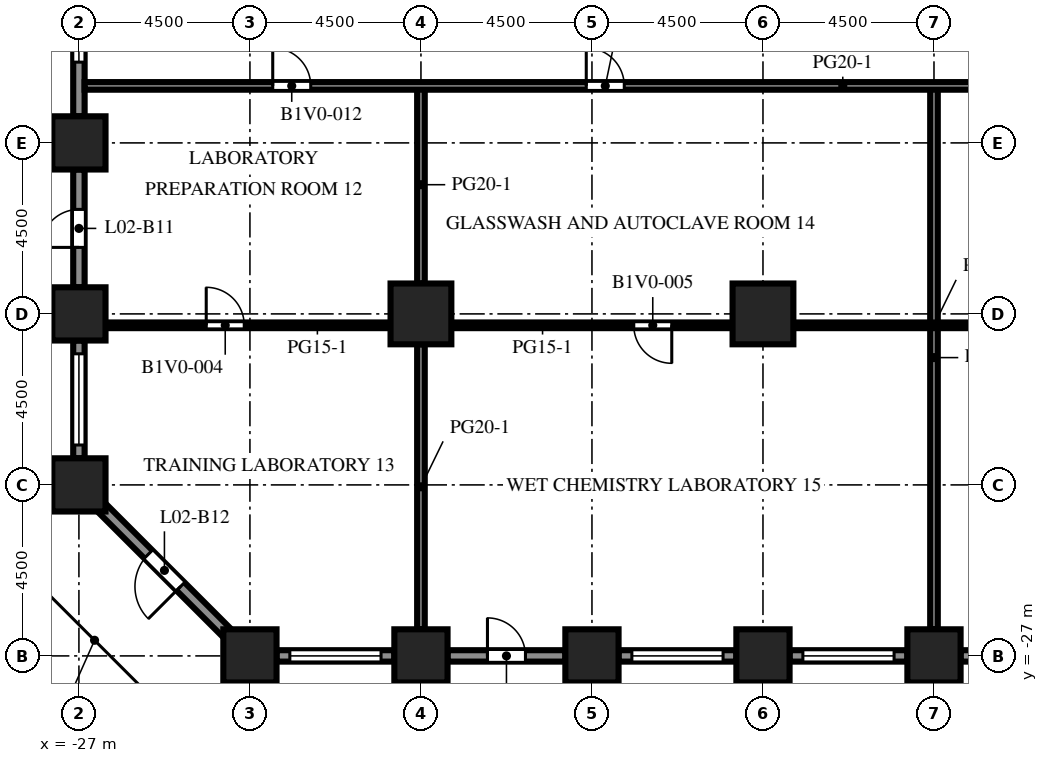
"""IFC4 building model, lengths in metres.
Left out: names, types, materials, properties, quantities, classifications, styles, units other than length and angle.
Written with IfcOpenShell. Run it as: python <this file> out.ifc"""

import sys

from ifc_helpers import new_model, si_unit, direction, frame, frame_2d, origin, origin_2d, place, context, subcontext, project, spatial, rectangle, extrude, element, fill, save


model = new_model("IFC4")
c1 = context("Model", 3, precision=1e-05, world=origin(), true_north=direction((0.0, 1.0)))
c2 = subcontext(c1, "Body", "Model", "MODEL_VIEW")
j1 = project(units=[si_unit("LENGTHUNIT", "METRE"), si_unit("PLANEANGLEUNIT", "RADIAN")], contexts=[c1])
p1 = place(None, origin())
s1 = spatial("IfcSite", under=j1, at=p1, CompositionType="ELEMENT")
p2 = place(p1, origin())
s2 = spatial("IfcBuilding", under=s1, at=p2, CompositionType="ELEMENT")
p3 = place(p2, frame((0.0, 0.0, 11.3)))
s3 = spatial("IfcBuildingStorey", under=s2, at=p3, CompositionType="ELEMENT", Elevation=11.3)
for number, where, z_axis, x_axis in (
    (1, (-27.0, -22.5, 0.0), (0.0, 0.0, 1.0), (1.0, 0.0, 0.0)),
    (2, (-27.0, -18.0, 0.0), (0.0, 0.0, 1.0), (1.0, 0.0, 0.0)),
    (3, (-27.0, -13.5, 0.0), (0.0, 0.0, 1.0), (1.0, 0.0, 0.0)),
    (4, (-22.5, -27.0, 0.0), (0.0, 0.0, 1.0), (1.0, 0.0, 0.0)),
    (5, (-18.0, -27.0, 0.0), (0.0, 0.0, 1.0), (1.0, 0.0, 0.0)),
    (6, (-13.5, -27.0, 0.0), (0.0, 0.0, 1.0), (1.0, 0.0, 0.0)),
    (7, (-9.0, -27.0, 0.0), (0.0, 0.0, 1.0), (1.0, 0.0, 0.0)),
    (8, (-4.5, -27.0, 0.0), (0.0, 0.0, 1.0), (1.0, 0.0, 0.0)),
):
    element("IfcColumn", number, at=place(p3, frame(where, z_axis=z_axis, x_axis=x_axis)), inside=s3, PredefinedType="COLUMN", context=c2, shape_type="SweptSolid", body=[
        extrude(rectangle(XDim=1.4, YDim=1.4, at=origin_2d()), origin(), (0.0, 0.0, 1.0), 4.1),
    ])
for number, where, z_axis, x_axis in (
    (9, (-18.0, -18.0, 0.0), (0.0, 0.0, 1.0), (1.0, 0.0, 0.0)),
    (10, (-9.0, -18.0, 0.0), (0.0, 0.0, 1.0), (1.0, 0.0, 0.0)),
):
    element("IfcColumn", number, at=place(p3, frame(where, z_axis=z_axis, x_axis=x_axis)), inside=s3, PredefinedType="COLUMN", context=c2, shape_type="SweptSolid", body=[
        extrude(rectangle(XDim=1.6, YDim=1.6, at=origin_2d()), origin(), (0.0, 0.0, 1.0), 4.1),
    ])
p4 = place(p3, frame((-18.7, -27.0, 0.0), z_axis=(0.0, 0.0, 1.0), x_axis=(-1.0, 0.0, 0.0)))
e11 = element("IfcWall", 11, at=p4, inside=s3, PredefinedType="SOLIDWALL", context=c2, shape_type="SweptSolid", body=[
    extrude(rectangle(XDim=3.1, YDim=0.3, at=frame_2d((1.55, 0.0))), origin(), (0.0, 0.0, 1.0), 2.75),
])
p5 = place(p4, frame((0.35, 0.0, 0.8)))
e12 = element("IfcOpeningElement", 12, at=p5, cuts=e11, PredefinedType="OPENING", context=c2, shape_type="SweptSolid", body=[
    extrude(rectangle(XDim=2.4, YDim=1.7, at=frame_2d((1.2, 0.85))), frame((0.0, 0.16, 0.0), z_axis=(0.0, -1.0, 0.0), x_axis=(1.0, 0.0, 0.0)), (0.0, 0.0, 1.0), 0.32),
])
p6 = place(p3, frame((-14.2, -27.0, 0.0), z_axis=(0.0, 0.0, 1.0), x_axis=(-1.0, 0.0, 0.0)))
e13 = element("IfcWall", 13, at=p6, inside=s3, PredefinedType="SOLIDWALL", context=c2, shape_type="SweptSolid", body=[
    extrude(rectangle(XDim=3.1, YDim=0.3, at=frame_2d((1.55, 0.0))), origin(), (0.0, 0.0, 1.0), 2.75),
])
p7 = place(p6, frame((1.05, 0.0, 0.0)))
e14 = element("IfcOpeningElement", 14, at=p7, cuts=e13, PredefinedType="OPENING", context=c2, shape_type="SweptSolid", body=[
    extrude(rectangle(XDim=1.0, YDim=2.2, at=frame_2d((0.5, 1.1))), frame((0.0, 0.16, 0.0), z_axis=(0.0, -1.0, 0.0), x_axis=(1.0, 0.0, 0.0)), (0.0, 0.0, 1.0), 0.32),
])
p8 = place(p3, frame((-9.7, -27.0, 0.0), z_axis=(0.0, 0.0, 1.0), x_axis=(-1.0, 0.0, 0.0)))
e15 = element("IfcWall", 15, at=p8, inside=s3, PredefinedType="SOLIDWALL", context=c2, shape_type="SweptSolid", body=[
    extrude(rectangle(XDim=3.1, YDim=0.3, at=frame_2d((1.55, 0.0))), origin(), (0.0, 0.0, 1.0), 2.75),
])
p9 = place(p8, frame((0.35, 0.0, 0.8)))
e16 = element("IfcOpeningElement", 16, at=p9, cuts=e15, PredefinedType="OPENING", context=c2, shape_type="SweptSolid", body=[
    extrude(rectangle(XDim=2.4, YDim=1.7, at=frame_2d((1.2, 0.85))), frame((0.0, 0.16, 0.0), z_axis=(0.0, -1.0, 0.0), x_axis=(1.0, 0.0, 0.0)), (0.0, 0.0, 1.0), 0.32),
])
p10 = place(p3, frame((-5.2, -27.0, 0.0), z_axis=(0.0, 0.0, 1.0), x_axis=(-1.0, 0.0, 0.0)))
e17 = element("IfcWall", 17, at=p10, inside=s3, PredefinedType="SOLIDWALL", context=c2, shape_type="SweptSolid", body=[
    extrude(rectangle(XDim=3.1, YDim=0.3, at=frame_2d((1.55, 0.0))), origin(), (0.0, 0.0, 1.0), 2.75),
])
p11 = place(p10, frame((0.35, 0.0, 0.8)))
e18 = element("IfcOpeningElement", 18, at=p11, cuts=e17, PredefinedType="OPENING", context=c2, shape_type="SweptSolid", body=[
    extrude(rectangle(XDim=2.4, YDim=1.7, at=frame_2d((1.2, 0.85))), frame((0.0, 0.16, 0.0), z_axis=(0.0, -1.0, 0.0), x_axis=(1.0, 0.0, 0.0)), (0.0, 0.0, 1.0), 0.32),
])
p12 = place(p3, frame((-0.7, -27.0, 0.0), z_axis=(0.0, 0.0, 1.0), x_axis=(-1.0, 0.0, 0.0)))
e19 = element("IfcWall", 19, at=p12, inside=s3, PredefinedType="SOLIDWALL", context=c2, shape_type="SweptSolid", body=[
    extrude(rectangle(XDim=3.1, YDim=0.3, at=frame_2d((1.55, 0.0))), origin(), (0.0, 0.0, 1.0), 2.75),
])
p13 = place(p12, frame((0.35, 0.0, 0.8)))
e20 = element("IfcOpeningElement", 20, at=p13, cuts=e19, PredefinedType="OPENING", context=c2, shape_type="SweptSolid", body=[
    extrude(rectangle(XDim=2.4, YDim=1.7, at=frame_2d((1.2, 0.85))), frame((0.0, 0.16, 0.0), z_axis=(0.0, -1.0, 0.0), x_axis=(1.0, 0.0, 0.0)), (0.0, 0.0, 1.0), 0.32),
])
p14 = place(p3, frame((-27.0, -12.8, 0.0), z_axis=(0.0, 0.0, 1.0), x_axis=(0.0, 1.0, 0.0)))
e21 = element("IfcWall", 21, at=p14, inside=s3, PredefinedType="SOLIDWALL", context=c2, shape_type="SweptSolid", body=[
    extrude(rectangle(XDim=3.1, YDim=0.3, at=frame_2d((1.55, 0.0))), origin(), (0.0, 0.0, 1.0), 2.75),
])
p15 = place(p14, frame((1.425, 0.0, 0.8)))
e22 = element("IfcOpeningElement", 22, at=p15, cuts=e21, PredefinedType="OPENING", context=c2, shape_type="SweptSolid", body=[
    extrude(rectangle(XDim=1.2, YDim=1.7, at=frame_2d((0.6, 0.85))), frame((0.0, 0.16, 0.0), z_axis=(0.0, -1.0, 0.0), x_axis=(1.0, 0.0, 0.0)), (0.0, 0.0, 1.0), 0.32),
])
p16 = place(p3, frame((-27.0, -17.3, 0.0), z_axis=(0.0, 0.0, 1.0), x_axis=(0.0, 1.0, 0.0)))
e23 = element("IfcWall", 23, at=p16, inside=s3, PredefinedType="SOLIDWALL", context=c2, shape_type="SweptSolid", body=[
    extrude(rectangle(XDim=3.1, YDim=0.3, at=frame_2d((1.55, 0.0))), origin(), (0.0, 0.0, 1.0), 2.75),
])
p17 = place(p16, frame((1.05, 0.0, 0.0)))
e24 = element("IfcOpeningElement", 24, at=p17, cuts=e23, PredefinedType="OPENING", context=c2, shape_type="SweptSolid", body=[
    extrude(rectangle(XDim=1.0, YDim=2.2, at=frame_2d((0.5, 1.1))), frame((0.0, 0.16, 0.0), z_axis=(0.0, -1.0, 0.0), x_axis=(1.0, 0.0, 0.0)), (0.0, 0.0, 1.0), 0.32),
])
p18 = place(p3, frame((-27.0, -21.8, 0.0), z_axis=(0.0, 0.0, 1.0), x_axis=(0.0, 1.0, 0.0)))
e25 = element("IfcWall", 25, at=p18, inside=s3, PredefinedType="SOLIDWALL", context=c2, shape_type="SweptSolid", body=[
    extrude(rectangle(XDim=3.1, YDim=0.3, at=frame_2d((1.55, 0.0))), origin(), (0.0, 0.0, 1.0), 2.75),
])
p19 = place(p18, frame((0.35, 0.0, 0.8)))
e26 = element("IfcOpeningElement", 26, at=p19, cuts=e25, PredefinedType="OPENING", context=c2, shape_type="SweptSolid", body=[
    extrude(rectangle(XDim=2.4, YDim=1.7, at=frame_2d((1.2, 0.85))), frame((0.0, 0.16, 0.0), z_axis=(0.0, -1.0, 0.0), x_axis=(1.0, 0.0, 0.0)), (0.0, 0.0, 1.0), 0.32),
])
p20 = place(p3, frame((-23.094, -26.406, 0.0), z_axis=(0.0, 0.0, 1.0), x_axis=(-0.707106781187, 0.707106781187, 0.0)))
e27 = element("IfcWall", 27, at=p20, inside=s3, PredefinedType="SOLIDWALL", context=c2, shape_type="SweptSolid", body=[
    extrude(rectangle(XDim=4.684, YDim=0.3, at=frame_2d((2.342, 0.0))), origin(), (0.0, 0.0, 1.0), 2.75),
])
p21 = place(p20, frame((1.742, 0.0, 0.0)))
e28 = element("IfcOpeningElement", 28, at=p21, cuts=e27, PredefinedType="OPENING", context=c2, shape_type="SweptSolid", body=[
    extrude(rectangle(XDim=1.2, YDim=2.2, at=frame_2d((0.6, 1.1))), frame((0.0, 0.16, 0.0), z_axis=(0.0, -1.0, 0.0), x_axis=(1.0, 0.0, 0.0)), (0.0, 0.0, 1.0), 0.32),
])
p22 = place(p3, frame((-18.0, -26.3, 0.0), z_axis=(0.0, 0.0, 1.0), x_axis=(0.0, 1.0, 0.0)))
e29 = element("IfcWall", 29, at=p22, inside=s3, PredefinedType="PARTITIONING", context=c2, shape_type="SweptSolid", body=[
    extrude(rectangle(XDim=7.5, YDim=0.2, at=frame_2d((3.75, 0.0))), origin(), (0.0, 0.0, 1.0), 3.65),
])
p23 = place(p3, frame((-18.0, -17.2, 0.0), z_axis=(0.0, 0.0, 1.0), x_axis=(0.0, 1.0, 0.0)))
e30 = element("IfcWall", 30, at=p23, inside=s3, PredefinedType="PARTITIONING", context=c2, shape_type="SweptSolid", body=[
    extrude(rectangle(XDim=5.2, YDim=0.2, at=frame_2d((2.6, 0.0))), origin(), (0.0, 0.0, 1.0), 3.65),
])
p24 = place(p3, frame((-4.5, -26.3, 0.0), z_axis=(0.0, 0.0, 1.0), x_axis=(0.0, 1.0, 0.0)))
e31 = element("IfcWall", 31, at=p24, inside=s3, PredefinedType="PARTITIONING", context=c2, shape_type="SweptSolid", body=[
    extrude(rectangle(XDim=14.3, YDim=0.2, at=frame_2d((7.15, 0.0))), origin(), (0.0, 0.0, 1.0), 3.65),
])
p25 = place(p3, frame((-18.8, -18.3, 0.0), z_axis=(0.0, 0.0, 1.0), x_axis=(-1.0, 0.0, 0.0)))
e32 = element("IfcWall", 32, at=p25, inside=s3, PredefinedType="PARTITIONING", context=c2, shape_type="SweptSolid", body=[
    extrude(rectangle(XDim=7.5, YDim=0.15, at=frame_2d((3.75, 0.0))), origin(), (0.0, 0.0, 1.0), 3.65),
])
p26 = place(p25, frame((3.85, 0.0, 0.0)))
e33 = element("IfcOpeningElement", 33, at=p26, cuts=e32, PredefinedType="OPENING", context=c2, shape_type="SweptSolid", body=[
    extrude(rectangle(XDim=1.0, YDim=2.1, at=frame_2d((0.5, 1.05))), frame((0.0, 0.085, 0.0), z_axis=(0.0, -1.0, 0.0), x_axis=(1.0, 0.0, 0.0)), (0.0, 0.0, 1.0), 0.17),
])
p27 = place(p3, frame((-9.8, -18.3, 0.0), z_axis=(0.0, 0.0, 1.0), x_axis=(-1.0, 0.0, 0.0)))
e34 = element("IfcWall", 34, at=p27, inside=s3, PredefinedType="PARTITIONING", context=c2, shape_type="SweptSolid", body=[
    extrude(rectangle(XDim=7.4, YDim=0.15, at=frame_2d((3.7, 0.0))), origin(), (0.0, 0.0, 1.0), 3.65),
])
p28 = place(p27, frame((1.6, 0.0, 0.0)))
e35 = element("IfcOpeningElement", 35, at=p28, cuts=e34, PredefinedType="OPENING", context=c2, shape_type="SweptSolid", body=[
    extrude(rectangle(XDim=1.0, YDim=2.1, at=frame_2d((0.5, 1.05))), frame((0.0, 0.085, 0.0), z_axis=(0.0, -1.0, 0.0), x_axis=(1.0, 0.0, 0.0)), (0.0, 0.0, 1.0), 0.17),
])
p29 = place(p3, frame((-8.2, -18.3, 0.0), z_axis=(0.0, 0.0, 1.0), x_axis=(1.0, 0.0, 0.0)))
e36 = element("IfcWall", 36, at=p29, inside=s3, PredefinedType="PARTITIONING", context=c2, shape_type="SweptSolid", body=[
    extrude(rectangle(XDim=7.4, YDim=0.15, at=frame_2d((3.7, 0.0))), origin(), (0.0, 0.0, 1.0), 3.65),
])
p30 = place(p3, frame((26.85, -12.0, 0.0), z_axis=(0.0, 0.0, 1.0), x_axis=(-1.0, 0.0, 0.0)))
e37 = element("IfcWall", 37, at=p30, inside=s3, PredefinedType="PARTITIONING", context=c2, shape_type="SweptSolid", body=[
    extrude(rectangle(XDim=53.7, YDim=0.2, at=frame_2d((26.85, 0.0))), origin(), (0.0, 0.0, 1.0), 3.65),
])
p31 = place(p30, frame((47.75, 0.0, 0.0)))
e38 = element("IfcOpeningElement", 38, at=p31, cuts=e37, PredefinedType="OPENING", context=c2, shape_type="SweptSolid", body=[
    extrude(rectangle(XDim=1.0, YDim=2.1, at=frame_2d((0.5, 1.05))), frame((0.0, 0.11, 0.0), z_axis=(0.0, -1.0, 0.0), x_axis=(1.0, 0.0, 0.0)), (0.0, 0.0, 1.0), 0.22),
])
p32 = place(p30, frame((39.5, 0.0, 0.0)))
e39 = element("IfcOpeningElement", 39, at=p32, cuts=e37, PredefinedType="OPENING", context=c2, shape_type="SweptSolid", body=[
    extrude(rectangle(XDim=1.0, YDim=2.1, at=frame_2d((0.5, 1.05))), frame((0.0, 0.11, 0.0), z_axis=(0.0, -1.0, 0.0), x_axis=(1.0, 0.0, 0.0)), (0.0, 0.0, 1.0), 0.22),
])
p33 = place(p30, frame((27.0, 0.0, 0.0)))
e40 = element("IfcOpeningElement", 40, at=p33, cuts=e37, PredefinedType="OPENING", context=c2, shape_type="SweptSolid", body=[
    extrude(rectangle(XDim=1.0, YDim=2.1, at=frame_2d((0.5, 1.05))), frame((0.0, 0.11, 0.0), z_axis=(0.0, -1.0, 0.0), x_axis=(1.0, 0.0, 0.0)), (0.0, 0.0, 1.0), 0.22),
])
p34 = place(p30, frame((17.0, 0.0, 0.0)))
e41 = element("IfcOpeningElement", 41, at=p34, cuts=e37, PredefinedType="OPENING", context=c2, shape_type="SweptSolid", body=[
    extrude(rectangle(XDim=1.0, YDim=2.1, at=frame_2d((0.5, 1.05))), frame((0.0, 0.11, 0.0), z_axis=(0.0, -1.0, 0.0), x_axis=(1.0, 0.0, 0.0)), (0.0, 0.0, 1.0), 0.22),
])
p35 = place(p30, frame((10.0, 0.0, 0.0)))
e42 = element("IfcOpeningElement", 42, at=p35, cuts=e37, PredefinedType="OPENING", context=c2, shape_type="SweptSolid", body=[
    extrude(rectangle(XDim=1.0, YDim=2.1, at=frame_2d((0.5, 1.05))), frame((0.0, 0.11, 0.0), z_axis=(0.0, -1.0, 0.0), x_axis=(1.0, 0.0, 0.0)), (0.0, 0.0, 1.0), 0.22),
])
p36 = place(p30, frame((4.0, 0.0, 0.0)))
e43 = element("IfcOpeningElement", 43, at=p36, cuts=e37, PredefinedType="OPENING", context=c2, shape_type="SweptSolid", body=[
    extrude(rectangle(XDim=1.0, YDim=2.1, at=frame_2d((0.5, 1.05))), frame((0.0, 0.11, 0.0), z_axis=(0.0, -1.0, 0.0), x_axis=(1.0, 0.0, 0.0)), (0.0, 0.0, 1.0), 0.22),
])
p37 = place(p5, origin())
e44 = element("IfcWindow", 44, at=p37, inside=s3, PartitioningType="SINGLE_PANEL", PredefinedType="WINDOW", context=c2, shape_type="SweptSolid", body=[
    extrude(rectangle(XDim=2.4, YDim=1.7, at=frame_2d((1.2, 0.85))), frame((0.0, 0.03, 0.0), z_axis=(0.0, -1.0, 0.0), x_axis=(1.0, 0.0, 0.0)), (0.0, 0.0, 1.0), 0.06),
])
fill(e12, e44)
p38 = place(p7, origin())
e45 = element("IfcDoor", 45, at=p38, inside=s3, OperationType="SINGLE_SWING_RIGHT", PredefinedType="DOOR", context=c2, shape_type="SweptSolid", body=[
    extrude(rectangle(XDim=1.0, YDim=2.2, at=frame_2d((0.5, 1.1))), frame((0.0, 0.025, 0.0), z_axis=(0.0, -1.0, 0.0), x_axis=(1.0, 0.0, 0.0)), (0.0, 0.0, 1.0), 0.05),
])
fill(e14, e45)
p39 = place(p9, origin())
e46 = element("IfcWindow", 46, at=p39, inside=s3, PartitioningType="SINGLE_PANEL", PredefinedType="WINDOW", context=c2, shape_type="SweptSolid", body=[
    extrude(rectangle(XDim=2.4, YDim=1.7, at=frame_2d((1.2, 0.85))), frame((0.0, 0.03, 0.0), z_axis=(0.0, -1.0, 0.0), x_axis=(1.0, 0.0, 0.0)), (0.0, 0.0, 1.0), 0.06),
])
fill(e16, e46)
p40 = place(p11, origin())
e47 = element("IfcWindow", 47, at=p40, inside=s3, PartitioningType="SINGLE_PANEL", PredefinedType="WINDOW", context=c2, shape_type="SweptSolid", body=[
    extrude(rectangle(XDim=2.4, YDim=1.7, at=frame_2d((1.2, 0.85))), frame((0.0, 0.03, 0.0), z_axis=(0.0, -1.0, 0.0), x_axis=(1.0, 0.0, 0.0)), (0.0, 0.0, 1.0), 0.06),
])
fill(e18, e47)
p41 = place(p15, origin())
e48 = element("IfcWindow", 48, at=p41, inside=s3, PartitioningType="SINGLE_PANEL", PredefinedType="WINDOW", context=c2, shape_type="SweptSolid", body=[
    extrude(rectangle(XDim=1.2, YDim=1.7, at=frame_2d((0.6, 0.85))), frame((0.0, 0.03, 0.0), z_axis=(0.0, -1.0, 0.0), x_axis=(1.0, 0.0, 0.0)), (0.0, 0.0, 1.0), 0.06),
])
fill(e22, e48)
p42 = place(p17, origin())
e49 = element("IfcDoor", 49, at=p42, inside=s3, OperationType="SINGLE_SWING_LEFT", PredefinedType="DOOR", context=c2, shape_type="SweptSolid", body=[
    extrude(rectangle(XDim=1.0, YDim=2.2, at=frame_2d((0.5, 1.1))), frame((0.0, 0.025, 0.0), z_axis=(0.0, -1.0, 0.0), x_axis=(1.0, 0.0, 0.0)), (0.0, 0.0, 1.0), 0.05),
])
fill(e24, e49)
p43 = place(p19, origin())
e50 = element("IfcWindow", 50, at=p43, inside=s3, PartitioningType="SINGLE_PANEL", PredefinedType="WINDOW", context=c2, shape_type="SweptSolid", body=[
    extrude(rectangle(XDim=2.4, YDim=1.7, at=frame_2d((1.2, 0.85))), frame((0.0, 0.03, 0.0), z_axis=(0.0, -1.0, 0.0), x_axis=(1.0, 0.0, 0.0)), (0.0, 0.0, 1.0), 0.06),
])
fill(e26, e50)
p44 = place(p21, origin())
e51 = element("IfcDoor", 51, at=p44, inside=s3, OperationType="SINGLE_SWING_LEFT", PredefinedType="DOOR", context=c2, shape_type="SweptSolid", body=[
    extrude(rectangle(XDim=1.2, YDim=2.2, at=frame_2d((0.6, 1.1))), frame((0.0, 0.025, 0.0), z_axis=(0.0, -1.0, 0.0), x_axis=(1.0, 0.0, 0.0)), (0.0, 0.0, 1.0), 0.05),
])
fill(e28, e51)
p45 = place(p26, origin())
e52 = element("IfcDoor", 52, at=p45, inside=s3, OperationType="SINGLE_SWING_RIGHT", PredefinedType="DOOR", context=c2, shape_type="SweptSolid", body=[
    extrude(rectangle(XDim=1.0, YDim=2.1, at=frame_2d((0.5, 1.05))), frame((0.0, 0.025, 0.0), z_axis=(0.0, -1.0, 0.0), x_axis=(1.0, 0.0, 0.0)), (0.0, 0.0, 1.0), 0.05),
])
fill(e33, e52)
p46 = place(p28, origin())
e53 = element("IfcDoor", 53, at=p46, inside=s3, OperationType="SINGLE_SWING_LEFT", PredefinedType="DOOR", context=c2, shape_type="SweptSolid", body=[
    extrude(rectangle(XDim=1.0, YDim=2.1, at=frame_2d((0.5, 1.05))), frame((0.0, 0.025, 0.0), z_axis=(0.0, -1.0, 0.0), x_axis=(1.0, 0.0, 0.0)), (0.0, 0.0, 1.0), 0.05),
])
fill(e35, e53)
p47 = place(p31, origin())
e54 = element("IfcDoor", 54, at=p47, inside=s3, OperationType="SINGLE_SWING_RIGHT", PredefinedType="DOOR", context=c2, shape_type="SweptSolid", body=[
    extrude(rectangle(XDim=1.0, YDim=2.1, at=frame_2d((0.5, 1.05))), frame((0.0, 0.025, 0.0), z_axis=(0.0, -1.0, 0.0), x_axis=(1.0, 0.0, 0.0)), (0.0, 0.0, 1.0), 0.05),
])
fill(e38, e54)
p48 = place(p32, origin())
e55 = element("IfcDoor", 55, at=p48, inside=s3, OperationType="SINGLE_SWING_RIGHT", PredefinedType="DOOR", context=c2, shape_type="SweptSolid", body=[
    extrude(rectangle(XDim=1.0, YDim=2.1, at=frame_2d((0.5, 1.05))), frame((0.0, 0.025, 0.0), z_axis=(0.0, -1.0, 0.0), x_axis=(1.0, 0.0, 0.0)), (0.0, 0.0, 1.0), 0.05),
])
fill(e39, e55)
save(model, sys.argv[1])
